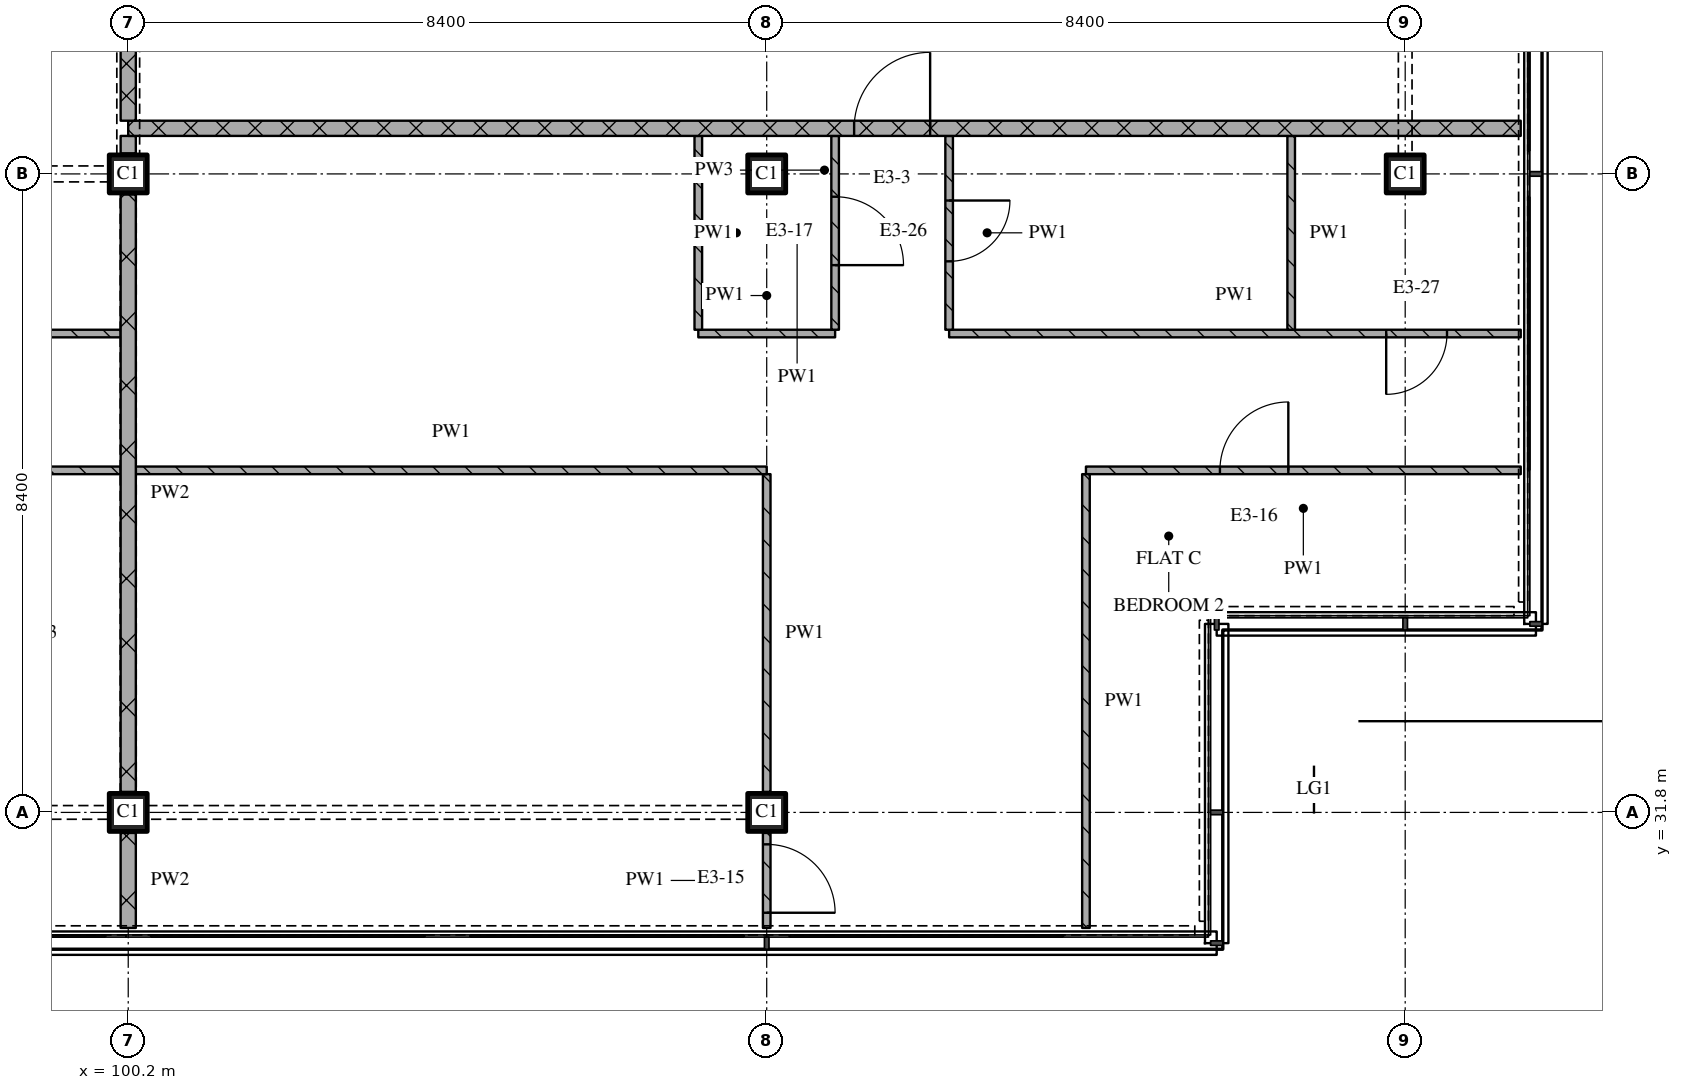
"""IFC4 building model, lengths in metres.
Left out: names, types, materials, properties, quantities, classifications, styles, units other than length and angle.
Written with IfcOpenShell. Run it as: python <this file> out.ifc"""

import sys

from ifc_helpers import new_model, si_unit, direction, frame, frame_2d, origin, origin_2d, place, context, subcontext, project, spatial, rectangle, extrude, element, fill, save


model = new_model("IFC4")
c1 = context("Model", 3, precision=1e-05, world=origin(), true_north=direction((0.0, 1.0)))
c2 = subcontext(c1, "Body", "Model", "MODEL_VIEW")
j1 = project(units=[si_unit("LENGTHUNIT", "METRE"), si_unit("PLANEANGLEUNIT", "RADIAN")], contexts=[c1])
p1 = place(None, origin())
s1 = spatial("IfcSite", under=j1, at=p1, CompositionType="ELEMENT")
p2 = place(p1, origin())
s2 = spatial("IfcBuilding", under=s1, at=p2, CompositionType="ELEMENT")
p3 = place(p2, frame((0.0, 0.0, 274.35)))
s3 = spatial("IfcBuildingStorey", under=s2, at=p3, CompositionType="ELEMENT", Elevation=274.35)
for number, where, z_axis, x_axis in (
    (1, (100.2, 31.8, 0.0), (0.0, 0.0, 1.0), (1.0, 0.0, 0.0)),
    (2, (100.2, 40.2, 0.0), (0.0, 0.0, 1.0), (1.0, 0.0, 0.0)),
    (3, (108.6, 31.8, 0.0), (0.0, 0.0, 1.0), (1.0, 0.0, 0.0)),
    (4, (108.6, 40.2, 0.0), (0.0, 0.0, 1.0), (1.0, 0.0, 0.0)),
    (5, (117.0, 40.2, 0.0), (0.0, 0.0, 1.0), (1.0, 0.0, 0.0)),
):
    element("IfcColumn", number, at=place(p3, frame(where, z_axis=z_axis, x_axis=x_axis)), inside=s3, PredefinedType="COLUMN", context=c2, shape_type="SweptSolid", body=[
        extrude(rectangle(XDim=0.5, YDim=0.5, at=origin_2d()), origin(), (0.0, 0.0, 1.0), 3.6),
    ])
p4 = place(p3, frame((118.52, 36.3, 0.0), z_axis=(0.0, 0.0, 1.0), x_axis=(-1.0, 0.0, 0.0)))
e6 = element("IfcWall", 6, at=p4, inside=s3, PredefinedType="PARTITIONING", context=c2, shape_type="SweptSolid", body=[
    extrude(rectangle(XDim=5.72, YDim=0.1, at=frame_2d((2.86, 0.0))), origin(), (0.0, 0.0, 1.0), 3.32),
])
p5 = place(p4, frame((3.058, 0.0, 0.0)))
e7 = element("IfcOpeningElement", 7, at=p5, cuts=e6, PredefinedType="OPENING", context=c2, shape_type="SweptSolid", body=[
    extrude(rectangle(XDim=0.9, YDim=2.1, at=frame_2d((0.45, 1.05))), frame((0.0, 0.06, 0.0), z_axis=(0.0, -1.0, 0.0), x_axis=(1.0, 0.0, 0.0)), (0.0, 0.0, 1.0), 0.12),
])
p6 = place(p3, frame((90.6, 38.1, 0.0), z_axis=(0.0, 0.0, 1.0), x_axis=(1.0, 0.0, 0.0)))
e8 = element("IfcWall", 8, at=p6, inside=s3, PredefinedType="PARTITIONING", context=c2, shape_type="SweptSolid", body=[
    extrude(rectangle(XDim=9.5, YDim=0.1, at=frame_2d((4.75, 0.0))), origin(), (0.0, 0.0, 1.0), 3.32),
])
p7 = place(p6, frame((4.35, 0.0, 0.0)))
e9 = element("IfcOpeningElement", 9, at=p7, cuts=e8, PredefinedType="OPENING", context=c2, shape_type="SweptSolid", body=[
    extrude(rectangle(XDim=0.9, YDim=2.1, at=frame_2d((0.45, 1.05))), frame((0.0, 0.06, 0.0), z_axis=(0.0, -1.0, 0.0), x_axis=(1.0, 0.0, 0.0)), (0.0, 0.0, 1.0), 0.12),
])
p8 = place(p3, frame((107.7, 38.1, 0.0), z_axis=(0.0, 0.0, 1.0), x_axis=(1.0, 0.0, 0.0)))
e10 = element("IfcWall", 10, at=p8, inside=s3, PredefinedType="PARTITIONING", context=c2, shape_type="SweptSolid", body=[
    extrude(rectangle(XDim=1.8, YDim=0.1, at=frame_2d((0.9, 0.0))), origin(), (0.0, 0.0, 1.0), 3.32),
])
p9 = place(p3, frame((111.0, 38.1, 0.0), z_axis=(0.0, 0.0, 1.0), x_axis=(1.0, 0.0, 0.0)))
e11 = element("IfcWall", 11, at=p9, inside=s3, PredefinedType="PARTITIONING", context=c2, shape_type="SweptSolid", body=[
    extrude(rectangle(XDim=7.52, YDim=0.1, at=frame_2d((3.76, 0.0))), origin(), (0.0, 0.0, 1.0), 3.32),
])
p10 = place(p9, frame((5.75, 0.0, 0.0)))
e12 = element("IfcOpeningElement", 12, at=p10, cuts=e11, PredefinedType="OPENING", context=c2, shape_type="SweptSolid", body=[
    extrude(rectangle(XDim=0.8, YDim=2.1, at=frame_2d((0.4, 1.05))), frame((0.0, 0.06, 0.0), z_axis=(0.0, -1.0, 0.0), x_axis=(1.0, 0.0, 0.0)), (0.0, 0.0, 1.0), 0.12),
])
p11 = place(p3, frame((118.52, 40.8, 0.0), z_axis=(0.0, 0.0, 1.0), x_axis=(-1.0, 0.0, 0.0)))
e13 = element("IfcWall", 13, at=p11, inside=s3, PredefinedType="PARTITIONING", context=c2, shape_type="SweptSolid", body=[
    extrude(rectangle(XDim=18.32, YDim=0.2, at=frame_2d((9.16, 0.0))), origin(), (0.0, 0.0, 1.0), 3.32),
])
p12 = place(p11, frame((7.77, 0.0, 0.0)))
e14 = element("IfcOpeningElement", 14, at=p12, cuts=e13, PredefinedType="OPENING", context=c2, shape_type="SweptSolid", body=[
    extrude(rectangle(XDim=1.0, YDim=2.1, at=frame_2d((0.5, 1.05))), frame((0.0, 0.11, 0.0), z_axis=(0.0, -1.0, 0.0), x_axis=(1.0, 0.0, 0.0)), (0.0, 0.0, 1.0), 0.22),
])
p13 = place(p3, frame((100.2, 43.1, 0.0), z_axis=(0.0, 0.0, 1.0), x_axis=(0.0, -1.0, 0.0)))
e15 = element("IfcWall", 15, at=p13, inside=s3, PredefinedType="PARTITIONING", context=c2, shape_type="SweptSolid", body=[
    extrude(rectangle(XDim=2.2, YDim=0.2, at=frame_2d((1.1, 0.0))), origin(), (0.0, 0.0, 1.0), 2.53),
])
p14 = place(p3, frame((100.2, 31.53, 0.0), z_axis=(0.0, 0.0, 1.0), x_axis=(0.0, -1.0, 0.0)))
e16 = element("IfcWall", 16, at=p14, inside=s3, PredefinedType="PARTITIONING", context=c2, shape_type="SweptSolid", body=[
    extrude(rectangle(XDim=1.25, YDim=0.2, at=frame_2d((0.625, 0.0))), origin(), (0.0, 0.0, 1.0), 3.32),
])
p15 = place(p3, frame((100.2, 39.93, 0.0), z_axis=(0.0, 0.0, 1.0), x_axis=(0.0, -1.0, 0.0)))
e17 = element("IfcWall", 17, at=p15, inside=s3, PredefinedType="PARTITIONING", context=c2, shape_type="SweptSolid", body=[
    extrude(rectangle(XDim=7.86, YDim=0.2, at=frame_2d((3.93, 0.0))), origin(), (0.0, 0.0, 1.0), 2.77),
])
p16 = place(p3, frame((100.2, 40.7, 0.0), z_axis=(0.0, 0.0, 1.0), x_axis=(0.0, -1.0, 0.0)))
e18 = element("IfcWall", 18, at=p16, inside=s3, PredefinedType="PARTITIONING", context=c2, shape_type="SweptSolid", body=[
    extrude(rectangle(XDim=0.23, YDim=0.2, at=frame_2d((0.115, 0.0))), origin(), (0.0, 0.0, 1.0), 3.32),
])
p17 = place(p3, frame((107.7, 40.7, 0.0), z_axis=(0.0, 0.0, 1.0), x_axis=(0.0, -1.0, 0.0)))
e19 = element("IfcWall", 19, at=p17, inside=s3, PredefinedType="PARTITIONING", context=c2, shape_type="SweptSolid", body=[
    extrude(rectangle(XDim=2.55, YDim=0.1, at=frame_2d((1.275, 0.0))), origin(), (0.0, 0.0, 1.0), 3.32),
])
p18 = place(p3, frame((108.6, 30.28, 0.0), z_axis=(0.0, 0.0, 1.0), x_axis=(0.0, 1.0, 0.0)))
e20 = element("IfcWall", 20, at=p18, inside=s3, PredefinedType="PARTITIONING", context=c2, shape_type="SweptSolid", body=[
    extrude(rectangle(XDim=1.25, YDim=0.1, at=frame_2d((0.625, 0.0))), origin(), (0.0, 0.0, 1.0), 3.32),
])
p19 = place(p18, frame((0.2, 0.0, 0.0)))
e21 = element("IfcOpeningElement", 21, at=p19, cuts=e20, PredefinedType="OPENING", context=c2, shape_type="SweptSolid", body=[
    extrude(rectangle(XDim=0.9, YDim=2.1, at=frame_2d((0.45, 1.05))), frame((0.0, 0.06, 0.0), z_axis=(0.0, -1.0, 0.0), x_axis=(1.0, 0.0, 0.0)), (0.0, 0.0, 1.0), 0.12),
])
p20 = place(p3, frame((108.6, 36.25, 0.0), z_axis=(0.0, 0.0, 1.0), x_axis=(0.0, -1.0, 0.0)))
e22 = element("IfcWall", 22, at=p20, inside=s3, PredefinedType="PARTITIONING", context=c2, shape_type="SweptSolid", body=[
    extrude(rectangle(XDim=4.18, YDim=0.1, at=frame_2d((2.09, 0.0))), origin(), (0.0, 0.0, 1.0), 3.32),
])
p21 = place(p3, frame((109.5, 38.15, 0.0), z_axis=(0.0, 0.0, 1.0), x_axis=(0.0, 1.0, 0.0)))
e23 = element("IfcWall", 23, at=p21, inside=s3, PredefinedType="PARTITIONING", context=c2, shape_type="SweptSolid", body=[
    extrude(rectangle(XDim=2.55, YDim=0.1, at=frame_2d((1.275, 0.0))), origin(), (0.0, 0.0, 1.0), 3.32),
])
p22 = place(p21, frame((0.85, 0.0, 0.0)))
e24 = element("IfcOpeningElement", 24, at=p22, cuts=e23, PredefinedType="OPENING", context=c2, shape_type="SweptSolid", body=[
    extrude(rectangle(XDim=0.9, YDim=2.1, at=frame_2d((0.45, 1.05))), frame((0.0, 0.06, 0.0), z_axis=(0.0, -1.0, 0.0), x_axis=(1.0, 0.0, 0.0)), (0.0, 0.0, 1.0), 0.12),
])
p23 = place(p3, frame((111.0, 40.7, 0.0), z_axis=(0.0, 0.0, 1.0), x_axis=(0.0, -1.0, 0.0)))
e25 = element("IfcWall", 25, at=p23, inside=s3, PredefinedType="PARTITIONING", context=c2, shape_type="SweptSolid", body=[
    extrude(rectangle(XDim=2.55, YDim=0.1, at=frame_2d((1.275, 0.0))), origin(), (0.0, 0.0, 1.0), 3.32),
])
p24 = place(p23, frame((0.85, 0.0, 0.0)))
e26 = element("IfcOpeningElement", 26, at=p24, cuts=e25, PredefinedType="OPENING", context=c2, shape_type="SweptSolid", body=[
    extrude(rectangle(XDim=0.8, YDim=2.1, at=frame_2d((0.4, 1.05))), frame((0.0, 0.06, 0.0), z_axis=(0.0, -1.0, 0.0), x_axis=(1.0, 0.0, 0.0)), (0.0, 0.0, 1.0), 0.12),
])
p25 = place(p3, frame((112.8, 36.25, 0.0), z_axis=(0.0, 0.0, 1.0), x_axis=(0.0, -1.0, 0.0)))
e27 = element("IfcWall", 27, at=p25, inside=s3, PredefinedType="PARTITIONING", context=c2, shape_type="SweptSolid", body=[
    extrude(rectangle(XDim=5.97, YDim=0.1, at=frame_2d((2.985, 0.0))), origin(), (0.0, 0.0, 1.0), 3.32),
])
p26 = place(p3, frame((115.5, 40.7, 0.0), z_axis=(0.0, 0.0, 1.0), x_axis=(0.0, -1.0, 0.0)))
e28 = element("IfcWall", 28, at=p26, inside=s3, PredefinedType="PARTITIONING", context=c2, shape_type="SweptSolid", body=[
    extrude(rectangle(XDim=2.55, YDim=0.1, at=frame_2d((1.275, 0.0))), origin(), (0.0, 0.0, 1.0), 3.32),
])
p27 = place(p3, frame((100.1, 36.3, 0.0), z_axis=(0.0, 0.0, 1.0), x_axis=(-1.0, 0.0, 0.0)))
e29 = element("IfcWall", 29, at=p27, inside=s3, PredefinedType="PARTITIONING", context=c2, shape_type="SweptSolid", body=[
    extrude(rectangle(XDim=12.5, YDim=0.1, at=frame_2d((6.25, 0.0))), origin(), (0.0, 0.0, 1.0), 3.32),
])
p28 = place(p27, frame((1.55, 0.0, 0.0)))
e30 = element("IfcOpeningElement", 30, at=p28, cuts=e29, PredefinedType="OPENING", context=c2, shape_type="SweptSolid", body=[
    extrude(rectangle(XDim=0.9, YDim=2.1, at=frame_2d((0.45, 1.05))), frame((0.0, 0.06, 0.0), z_axis=(0.0, -1.0, 0.0), x_axis=(1.0, 0.0, 0.0)), (0.0, 0.0, 1.0), 0.12),
])
p29 = place(p27, frame((7.85, 0.0, 0.0)))
e31 = element("IfcOpeningElement", 31, at=p29, cuts=e29, PredefinedType="OPENING", context=c2, shape_type="SweptSolid", body=[
    extrude(rectangle(XDim=0.9, YDim=2.1, at=frame_2d((0.45, 1.05))), frame((0.0, 0.06, 0.0), z_axis=(0.0, -1.0, 0.0), x_axis=(1.0, 0.0, 0.0)), (0.0, 0.0, 1.0), 0.12),
])
p30 = place(p3, frame((100.3, 36.3, 0.0), z_axis=(0.0, 0.0, 1.0), x_axis=(1.0, 0.0, 0.0)))
e32 = element("IfcWall", 32, at=p30, inside=s3, PredefinedType="PARTITIONING", context=c2, shape_type="SweptSolid", body=[
    extrude(rectangle(XDim=8.3, YDim=0.1, at=frame_2d((4.15, 0.0))), origin(), (0.0, 0.0, 1.0), 3.32),
])
p31 = place(p5, origin())
e33 = element("IfcDoor", 33, at=p31, inside=s3, OperationType="SINGLE_SWING_RIGHT", PredefinedType="DOOR", context=c2, shape_type="SweptSolid", body=[
    extrude(rectangle(XDim=0.9, YDim=2.1, at=frame_2d((0.45, 1.05))), frame((0.0, 0.025, 0.0), z_axis=(0.0, -1.0, 0.0), x_axis=(1.0, 0.0, 0.0)), (0.0, 0.0, 1.0), 0.05),
])
fill(e7, e33)
p32 = place(p10, origin())
e34 = element("IfcDoor", 34, at=p32, inside=s3, OperationType="SINGLE_SWING_RIGHT", PredefinedType="DOOR", context=c2, shape_type="SweptSolid", body=[
    extrude(rectangle(XDim=0.8, YDim=2.1, at=frame_2d((0.4, 1.05))), frame((0.0, 0.025, 0.0), z_axis=(0.0, -1.0, 0.0), x_axis=(1.0, 0.0, 0.0)), (0.0, 0.0, 1.0), 0.05),
])
fill(e12, e34)
p33 = place(p12, origin())
e35 = element("IfcDoor", 35, at=p33, inside=s3, OperationType="SINGLE_SWING_RIGHT", PredefinedType="DOOR", context=c2, shape_type="SweptSolid", body=[
    extrude(rectangle(XDim=1.0, YDim=2.1, at=frame_2d((0.5, 1.05))), frame((0.0, 0.025, 0.0), z_axis=(0.0, -1.0, 0.0), x_axis=(1.0, 0.0, 0.0)), (0.0, 0.0, 1.0), 0.05),
])
fill(e14, e35)
p34 = place(p19, origin())
e36 = element("IfcDoor", 36, at=p34, inside=s3, OperationType="SINGLE_SWING_RIGHT", PredefinedType="DOOR", context=c2, shape_type="SweptSolid", body=[
    extrude(rectangle(XDim=0.9, YDim=2.1, at=frame_2d((0.45, 1.05))), frame((0.0, 0.025, 0.0), z_axis=(0.0, -1.0, 0.0), x_axis=(1.0, 0.0, 0.0)), (0.0, 0.0, 1.0), 0.05),
])
fill(e21, e36)
p35 = place(p22, origin())
e37 = element("IfcDoor", 37, at=p35, inside=s3, OperationType="SINGLE_SWING_RIGHT", PredefinedType="DOOR", context=c2, shape_type="SweptSolid", body=[
    extrude(rectangle(XDim=0.9, YDim=2.1, at=frame_2d((0.45, 1.05))), frame((0.0, 0.025, 0.0), z_axis=(0.0, -1.0, 0.0), x_axis=(1.0, 0.0, 0.0)), (0.0, 0.0, 1.0), 0.05),
])
fill(e24, e37)
p36 = place(p24, origin())
e38 = element("IfcDoor", 38, at=p36, inside=s3, OperationType="SINGLE_SWING_LEFT", PredefinedType="DOOR", context=c2, shape_type="SweptSolid", body=[
    extrude(rectangle(XDim=0.8, YDim=2.1, at=frame_2d((0.4, 1.05))), frame((0.0, 0.025, 0.0), z_axis=(0.0, -1.0, 0.0), x_axis=(1.0, 0.0, 0.0)), (0.0, 0.0, 1.0), 0.05),
])
fill(e26, e38)
save(model, sys.argv[1])
